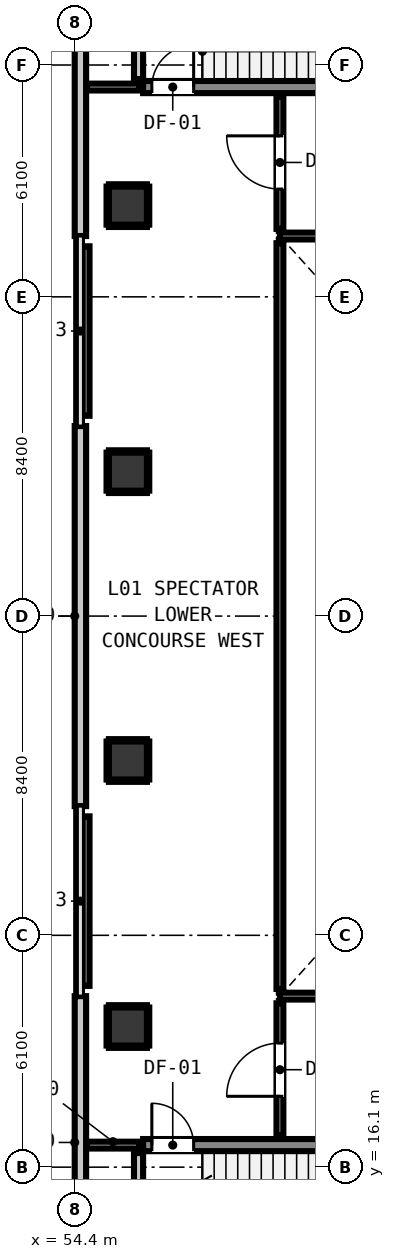
"""IFC4 building model, lengths in metres.
Left out: names, types, materials, properties, quantities, classifications, styles, units other than length and angle.
Written with IfcOpenShell. Run it as: python <this file> out.ifc"""

import sys

from ifc_helpers import new_model, si_unit, direction, frame, frame_2d, origin, origin_2d, place, context, subcontext, project, spatial, rectangle, extrude, element, fill, save


model = new_model("IFC4")
c1 = context("Model", 3, precision=1e-05, world=origin(), true_north=direction((0.0, 1.0)))
c2 = subcontext(c1, "Body", "Model", "MODEL_VIEW")
j1 = project(units=[si_unit("LENGTHUNIT", "METRE"), si_unit("PLANEANGLEUNIT", "RADIAN")], contexts=[c1])
p1 = place(None, origin())
s1 = spatial("IfcSite", under=j1, at=p1, CompositionType="ELEMENT")
p2 = place(p1, origin())
s2 = spatial("IfcBuilding", under=s1, at=p2, CompositionType="ELEMENT")
p3 = place(p2, frame((0.0, 0.0, 5.2)))
s3 = spatial("IfcBuildingStorey", under=s2, at=p3, CompositionType="ELEMENT", Elevation=5.2)
p4 = place(p3, frame((56.2, 16.68, 0.0), z_axis=(0.0, 0.0, 1.0), x_axis=(1.0, 0.0, 0.0)))
e1 = element("IfcWall", 1, at=p4, inside=s3, PredefinedType="SHEAR", context=c2, shape_type="SweptSolid", body=[
    extrude(rectangle(XDim=8.4, YDim=0.32, at=frame_2d((4.2, 0.0))), origin(), (0.0, 0.0, 1.0), 4.2),
])
p5 = place(p4, frame((0.23, 0.0, 0.0)))
e2 = element("IfcOpeningElement", 2, at=p5, cuts=e1, PredefinedType="OPENING", context=c2, shape_type="SweptSolid", body=[
    extrude(rectangle(XDim=1.1, YDim=2.15, at=frame_2d((0.55, 1.075))), frame((0.0, 0.17, 0.0), z_axis=(0.0, -1.0, 0.0), x_axis=(1.0, 0.0, 0.0)), (0.0, 0.0, 1.0), 0.34),
])
p6 = place(p3, frame((56.2, 44.52, 0.0), z_axis=(0.0, 0.0, 1.0), x_axis=(1.0, 0.0, 0.0)))
e3 = element("IfcWall", 3, at=p6, inside=s3, PredefinedType="SHEAR", context=c2, shape_type="SweptSolid", body=[
    extrude(rectangle(XDim=8.4, YDim=0.32, at=frame_2d((4.2, 0.0))), origin(), (0.0, 0.0, 1.0), 4.2),
])
p7 = place(p6, frame((0.23, 0.0, 0.0)))
e4 = element("IfcOpeningElement", 4, at=p7, cuts=e3, PredefinedType="OPENING", context=c2, shape_type="SweptSolid", body=[
    extrude(rectangle(XDim=1.1, YDim=2.15, at=frame_2d((0.55, 1.075))), frame((0.0, 0.17, 0.0), z_axis=(0.0, -1.0, 0.0), x_axis=(1.0, 0.0, 0.0)), (0.0, 0.0, 1.0), 0.34),
])
for number, where, z_axis, x_axis in (
    (5, (55.8, 19.8, 0.0), (0.0, 0.0, 1.0), (1.0, 0.0, 0.0)),
    (6, (55.8, 26.8, 0.0), (0.0, 0.0, 1.0), (1.0, 0.0, 0.0)),
    (7, (55.8, 34.4, 0.0), (0.0, 0.0, 1.0), (1.0, 0.0, 0.0)),
    (8, (55.8, 41.4, 0.0), (0.0, 0.0, 1.0), (1.0, 0.0, 0.0)),
):
    element("IfcColumn", number, at=place(p3, frame(where, z_axis=z_axis, x_axis=x_axis)), inside=s3, PredefinedType="COLUMN", context=c2, shape_type="SweptSolid", body=[
        extrude(rectangle(XDim=1.0, YDim=1.0, at=origin_2d()), origin(), (0.0, 0.0, 1.0), 4.2),
    ])
p8 = place(p3, frame((54.55, 12.9, 0.0), z_axis=(0.0, 0.0, 1.0), x_axis=(0.0, 1.0, 0.0)))
e9 = element("IfcWall", 9, at=p8, inside=s3, PredefinedType="STANDARD", context=c2, shape_type="SweptSolid", body=[
    extrude(rectangle(XDim=7.7, YDim=0.3, at=frame_2d((3.85, 0.0))), origin(), (0.0, 0.0, 1.0), 3.92),
])
p9 = place(p3, frame((54.55, 25.6, 0.0), z_axis=(0.0, 0.0, 1.0), x_axis=(0.0, 1.0, 0.0)))
e10 = element("IfcWall", 10, at=p9, inside=s3, PredefinedType="STANDARD", context=c2, shape_type="SweptSolid", body=[
    extrude(rectangle(XDim=10.0, YDim=0.3, at=frame_2d((5.0, 0.0))), origin(), (0.0, 0.0, 1.0), 3.92),
])
p10 = place(p3, frame((54.55, 40.6, 0.0), z_axis=(0.0, 0.0, 1.0), x_axis=(0.0, 1.0, 0.0)))
e11 = element("IfcWall", 11, at=p10, inside=s3, PredefinedType="STANDARD", context=c2, shape_type="SweptSolid", body=[
    extrude(rectangle(XDim=7.7, YDim=0.3, at=frame_2d((3.85, 0.0))), origin(), (0.0, 0.0, 1.0), 3.92),
])
for number, where, z_axis, x_axis in (
    (12, (56.08, 14.432, 0.0), (0.0, 0.0, 1.0), (0.0, 1.0, 0.0)),
    (13, (56.08, 44.73, 0.0), (0.0, 0.0, 1.0), (0.0, 1.0, 0.0)),
):
    element("IfcWall", number, at=place(p3, frame(where, z_axis=z_axis, x_axis=x_axis)), inside=s3, PredefinedType="PARTITIONING", context=c2, shape_type="SweptSolid", body=[
        extrude(rectangle(XDim=2.038, YDim=0.24, at=frame_2d((1.019, 0.0))), origin(), (0.0, 0.0, 1.0), 3.155),
    ])
p11 = place(p3, frame((54.712, 16.68, 0.0), z_axis=(0.0, 0.0, 1.0), x_axis=(1.0, 0.0, 0.0)))
e14 = element("IfcWall", 14, at=p11, inside=s3, PredefinedType="PARTITIONING", context=c2, shape_type="SweptSolid", body=[
    extrude(rectangle(XDim=1.388, YDim=0.18, at=frame_2d((0.694, 0.0))), origin(), (0.0, 0.0, 1.0), 3.92),
])
for number, where, z_axis, x_axis in (
    (15, (59.8, 20.6, 0.0), (0.0, 0.0, 1.0), (1.0, 0.0, 0.0)),
    (16, (59.8, 40.6, 0.0), (0.0, 0.0, 1.0), (1.0, 0.0, 0.0)),
):
    element("IfcWall", number, at=place(p3, frame(where, z_axis=z_axis, x_axis=x_axis)), inside=s3, PredefinedType="PARTITIONING", context=c2, shape_type="SweptSolid", body=[
        extrude(rectangle(XDim=18.0, YDim=0.18, at=frame_2d((9.0, 0.0))), origin(), (0.0, 0.0, 1.0), 3.92),
    ])
p12 = place(p3, frame((54.712, 44.52, 0.0), z_axis=(0.0, 0.0, 1.0), x_axis=(1.0, 0.0, 0.0)))
e17 = element("IfcWall", 17, at=p12, inside=s3, PredefinedType="PARTITIONING", context=c2, shape_type="SweptSolid", body=[
    extrude(rectangle(XDim=1.388, YDim=0.18, at=frame_2d((0.694, 0.0))), origin(), (0.0, 0.0, 1.0), 3.92),
])
for number, where, z_axis, x_axis in (
    (18, (54.7, 20.87, 0.0), (0.0, 0.0, 1.0), (0.0, 1.0, 0.0)),
    (19, (54.7, 35.87, 0.0), (0.0, 0.0, 1.0), (0.0, 1.0, 0.0)),
):
    element("IfcWall", number, at=place(p3, frame(where, z_axis=z_axis, x_axis=x_axis)), inside=s3, PredefinedType="PARTITIONING", context=c2, shape_type="SweptSolid", body=[
        extrude(rectangle(XDim=4.46, YDim=0.18, at=frame_2d((2.23, 0.0))), origin(), (0.0, 0.0, 1.0), 3.92),
    ])
p13 = place(p3, frame((59.8, 16.94, 0.0), z_axis=(0.0, 0.0, 1.0), x_axis=(0.0, 1.0, 0.0)))
e20 = element("IfcWall", 20, at=p13, inside=s3, PredefinedType="PARTITIONING", context=c2, shape_type="SweptSolid", body=[
    extrude(rectangle(XDim=3.472, YDim=0.18, at=frame_2d((1.736, 0.0))), origin(), (0.0, 0.0, 1.0), 3.92),
])
p14 = place(p13, frame((1.024, 0.0, 0.0)))
e21 = element("IfcOpeningElement", 21, at=p14, cuts=e20, PredefinedType="OPENING", context=c2, shape_type="SweptSolid", body=[
    extrude(rectangle(XDim=1.4, YDim=2.15, at=frame_2d((0.7, 1.075))), frame((0.0, 0.1, 0.0), z_axis=(0.0, -1.0, 0.0), x_axis=(1.0, 0.0, 0.0)), (0.0, 0.0, 1.0), 0.2),
])
p15 = place(p3, frame((59.8, 20.788, 0.0), z_axis=(0.0, 0.0, 1.0), x_axis=(0.0, 1.0, 0.0)))
e22 = element("IfcWall", 22, at=p15, inside=s3, PredefinedType="PARTITIONING", context=c2, shape_type="SweptSolid", body=[
    extrude(rectangle(XDim=19.624, YDim=0.18, at=frame_2d((9.812, 0.0))), origin(), (0.0, 0.0, 1.0), 3.92),
])
p16 = place(p3, frame((59.8, 40.788, 0.0), z_axis=(0.0, 0.0, 1.0), x_axis=(0.0, 1.0, 0.0)))
e23 = element("IfcWall", 23, at=p16, inside=s3, PredefinedType="PARTITIONING", context=c2, shape_type="SweptSolid", body=[
    extrude(rectangle(XDim=3.472, YDim=0.18, at=frame_2d((1.736, 0.0))), origin(), (0.0, 0.0, 1.0), 3.92),
])
p17 = place(p16, frame((1.048, 0.0, 0.0)))
e24 = element("IfcOpeningElement", 24, at=p17, cuts=e23, PredefinedType="OPENING", context=c2, shape_type="SweptSolid", body=[
    extrude(rectangle(XDim=1.4, YDim=2.15, at=frame_2d((0.7, 1.075))), frame((0.0, 0.1, 0.0), z_axis=(0.0, -1.0, 0.0), x_axis=(1.0, 0.0, 0.0)), (0.0, 0.0, 1.0), 0.2),
])
for number, where, z_axis, x_axis in (
    (25, (55.3, 19.268, 0.0), (0.0, 0.0, 1.0), (1.0, 0.0, 0.0)),
    (26, (55.3, 20.332, 0.0), (0.0, 0.0, 1.0), (1.0, 0.0, 0.0)),
    (27, (55.268, 19.3, 0.0), (0.0, 0.0, 1.0), (0.0, 1.0, 0.0)),
    (28, (56.332, 19.3, 0.0), (0.0, 0.0, 1.0), (0.0, 1.0, 0.0)),
    (29, (55.3, 26.268, 0.0), (0.0, 0.0, 1.0), (1.0, 0.0, 0.0)),
    (30, (55.3, 27.332, 0.0), (0.0, 0.0, 1.0), (1.0, 0.0, 0.0)),
    (31, (55.268, 26.3, 0.0), (0.0, 0.0, 1.0), (0.0, 1.0, 0.0)),
    (32, (56.332, 26.3, 0.0), (0.0, 0.0, 1.0), (0.0, 1.0, 0.0)),
    (33, (55.3, 33.868, 0.0), (0.0, 0.0, 1.0), (1.0, 0.0, 0.0)),
    (34, (55.3, 34.932, 0.0), (0.0, 0.0, 1.0), (1.0, 0.0, 0.0)),
    (35, (55.268, 33.9, 0.0), (0.0, 0.0, 1.0), (0.0, 1.0, 0.0)),
    (36, (56.332, 33.9, 0.0), (0.0, 0.0, 1.0), (0.0, 1.0, 0.0)),
    (37, (55.3, 40.868, 0.0), (0.0, 0.0, 1.0), (1.0, 0.0, 0.0)),
    (38, (55.3, 41.932, 0.0), (0.0, 0.0, 1.0), (1.0, 0.0, 0.0)),
    (39, (55.268, 40.9, 0.0), (0.0, 0.0, 1.0), (0.0, 1.0, 0.0)),
    (40, (56.332, 40.9, 0.0), (0.0, 0.0, 1.0), (0.0, 1.0, 0.0)),
):
    element("IfcWall", number, at=place(p3, frame(where, z_axis=z_axis, x_axis=x_axis)), inside=s3, PredefinedType="PARTITIONING", context=c2, shape_type="SweptSolid", body=[
        extrude(rectangle(XDim=1.0, YDim=0.06, at=frame_2d((0.5, 0.0))), origin(), (0.0, 0.0, 1.0), 1.45),
    ])
p18 = place(p5, origin())
e41 = element("IfcDoor", 41, at=p18, inside=s3, OperationType="SINGLE_SWING_LEFT", PredefinedType="DOOR", context=c2, shape_type="SweptSolid", body=[
    extrude(rectangle(XDim=1.1, YDim=2.15, at=frame_2d((0.55, 1.075))), frame((0.0, 0.025, 0.0), z_axis=(0.0, -1.0, 0.0), x_axis=(1.0, 0.0, 0.0)), (0.0, 0.0, 1.0), 0.05),
])
fill(e2, e41)
p19 = place(p7, origin())
e42 = element("IfcDoor", 42, at=p19, inside=s3, OperationType="SINGLE_SWING_RIGHT", PredefinedType="DOOR", context=c2, shape_type="SweptSolid", body=[
    extrude(rectangle(XDim=1.1, YDim=2.15, at=frame_2d((0.55, 1.075))), frame((0.0, 0.025, 0.0), z_axis=(0.0, -1.0, 0.0), x_axis=(1.0, 0.0, 0.0)), (0.0, 0.0, 1.0), 0.05),
])
fill(e4, e42)
p20 = place(p14, origin())
e43 = element("IfcDoor", 43, at=p20, inside=s3, OperationType="SINGLE_SWING_LEFT", PredefinedType="DOOR", context=c2, shape_type="SweptSolid", body=[
    extrude(rectangle(XDim=1.4, YDim=2.15, at=frame_2d((0.7, 1.075))), frame((0.0, 0.025, 0.0), z_axis=(0.0, -1.0, 0.0), x_axis=(1.0, 0.0, 0.0)), (0.0, 0.0, 1.0), 0.05),
])
fill(e21, e43)
p21 = place(p17, origin())
e44 = element("IfcDoor", 44, at=p21, inside=s3, OperationType="SINGLE_SWING_RIGHT", PredefinedType="DOOR", context=c2, shape_type="SweptSolid", body=[
    extrude(rectangle(XDim=1.4, YDim=2.15, at=frame_2d((0.7, 1.075))), frame((0.0, 0.025, 0.0), z_axis=(0.0, -1.0, 0.0), x_axis=(1.0, 0.0, 0.0)), (0.0, 0.0, 1.0), 0.05),
])
fill(e24, e44)
save(model, sys.argv[1])
